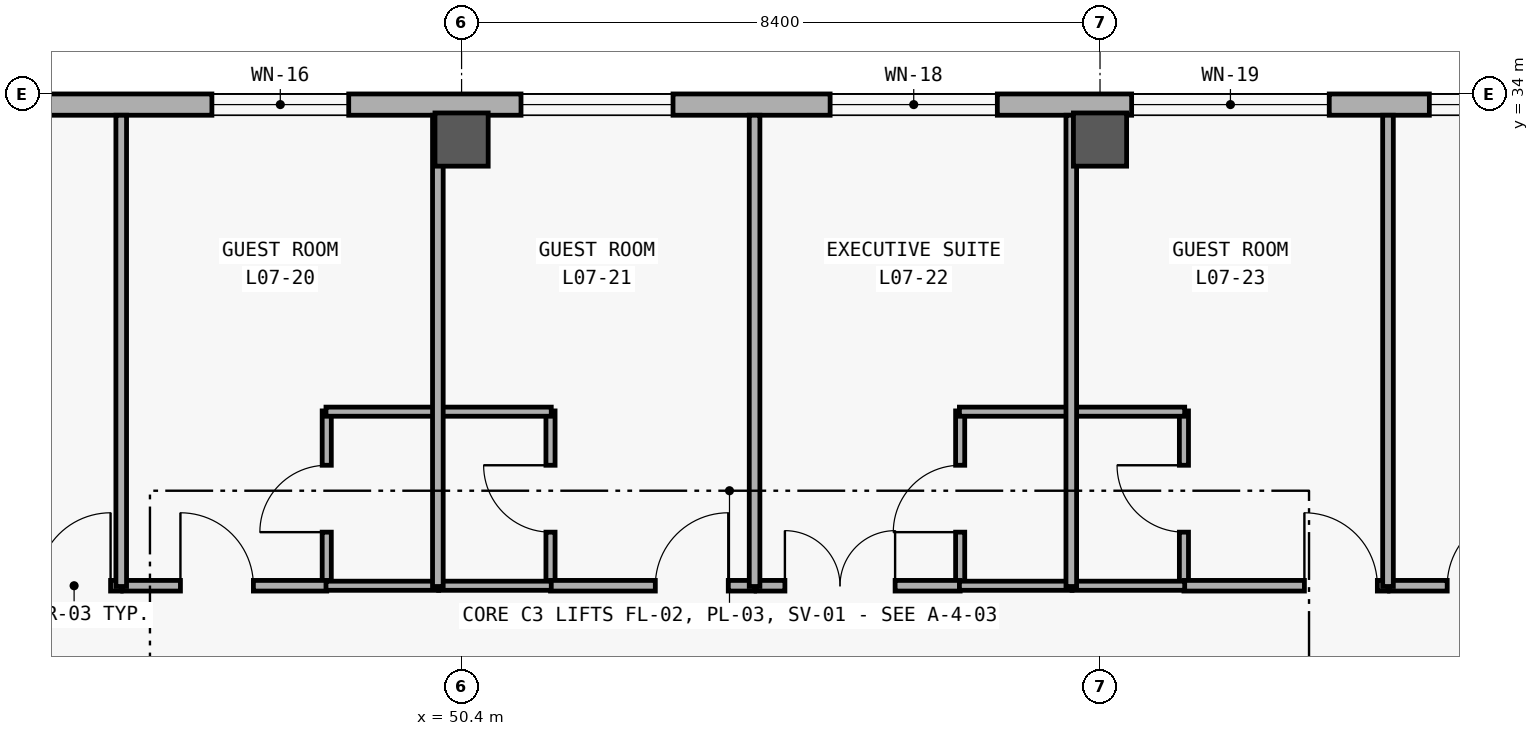
"""IFC4 building model, lengths in metres.
Left out: names, types, materials, properties, quantities, classifications, styles, units other than length and angle.
Written with IfcOpenShell. Run it as: python <this file> out.ifc"""

import sys

from ifc_helpers import new_model, si_unit, direction, frame, frame_2d, origin, origin_2d, place, context, subcontext, project, spatial, rectangle, extrude, element, fill, save


model = new_model("IFC4")
c1 = context("Model", 3, precision=1e-05, world=origin(), true_north=direction((0.0, 1.0)))
c2 = subcontext(c1, "Body", "Model", "MODEL_VIEW")
j1 = project(units=[si_unit("LENGTHUNIT", "METRE"), si_unit("PLANEANGLEUNIT", "RADIAN")], contexts=[c1])
p1 = place(None, origin())
s1 = spatial("IfcSite", under=j1, at=p1, CompositionType="ELEMENT")
p2 = place(p1, origin())
s2 = spatial("IfcBuilding", under=s1, at=p2, CompositionType="ELEMENT")
p3 = place(p2, frame((0.0, 0.0, 30.0)))
s3 = spatial("IfcBuildingStorey", under=s2, at=p3, CompositionType="ELEMENT", Elevation=30.0)
for number, where, z_axis, x_axis in (
    (1, (50.4, 33.4, 0.0), (0.0, 0.0, 1.0), (1.0, 0.0, 0.0)),
    (2, (58.8, 33.4, 0.0), (0.0, 0.0, 1.0), (1.0, 0.0, 0.0)),
):
    element("IfcColumn", number, at=place(p3, frame(where, z_axis=z_axis, x_axis=x_axis)), inside=s3, PredefinedType="COLUMN", context=c2, shape_type="SweptSolid", body=[
        extrude(rectangle(XDim=0.7, YDim=0.7, at=origin_2d()), origin(), (0.0, 0.0, 1.0), 3.6),
    ])
p4 = place(p3, frame((8.68, 33.86, 0.0), z_axis=(0.0, 0.0, 1.0), x_axis=(1.0, 0.0, 0.0)))
e3 = element("IfcWall", 3, at=p4, inside=s3, PredefinedType="SOLIDWALL", context=c2, shape_type="SweptSolid", body=[
    extrude(rectangle(XDim=66.64, YDim=0.28, at=frame_2d((33.32, 0.0))), origin(), (0.0, 0.0, 1.0), 3.34),
])
p5 = place(p4, frame((5.195, 0.0, 0.85)))
e4 = element("IfcOpeningElement", 4, at=p5, cuts=e3, PredefinedType="OPENING", context=c2, shape_type="SweptSolid", body=[
    extrude(rectangle(XDim=2.0, YDim=1.65, at=frame_2d((1.0, 0.825))), frame((0.0, 0.15, 0.0), z_axis=(0.0, -1.0, 0.0), x_axis=(1.0, 0.0, 0.0)), (0.0, 0.0, 1.0), 0.3),
])
p6 = place(p4, frame((13.209, 0.0, 0.85)))
e5 = element("IfcOpeningElement", 5, at=p6, cuts=e3, PredefinedType="OPENING", context=c2, shape_type="SweptSolid", body=[
    extrude(rectangle(XDim=2.25, YDim=1.75, at=frame_2d((1.125, 0.875))), frame((0.0, 0.15, 0.0), z_axis=(0.0, -1.0, 0.0), x_axis=(1.0, 0.0, 0.0)), (0.0, 0.0, 1.0), 0.3),
])
p7 = place(p4, frame((17.226, 0.0, 0.85)))
e6 = element("IfcOpeningElement", 6, at=p7, cuts=e3, PredefinedType="OPENING", context=c2, shape_type="SweptSolid", body=[
    extrude(rectangle(XDim=2.55, YDim=1.8, at=frame_2d((1.275, 0.9))), frame((0.0, 0.15, 0.0), z_axis=(0.0, -1.0, 0.0), x_axis=(1.0, 0.0, 0.0)), (0.0, 0.0, 1.0), 0.3),
])
p8 = place(p4, frame((21.242, 0.0, 0.85)))
e7 = element("IfcOpeningElement", 7, at=p8, cuts=e3, PredefinedType="OPENING", context=c2, shape_type="SweptSolid", body=[
    extrude(rectangle(XDim=2.85, YDim=1.85, at=frame_2d((1.425, 0.925))), frame((0.0, 0.15, 0.0), z_axis=(0.0, -1.0, 0.0), x_axis=(1.0, 0.0, 0.0)), (0.0, 0.0, 1.0), 0.3),
])
p9 = place(p4, frame((25.234, 0.0, 0.85)))
e8 = element("IfcOpeningElement", 8, at=p9, cuts=e3, PredefinedType="OPENING", context=c2, shape_type="SweptSolid", body=[
    extrude(rectangle(XDim=3.2, YDim=1.95, at=frame_2d((1.6, 0.975))), frame((0.0, 0.15, 0.0), z_axis=(0.0, -1.0, 0.0), x_axis=(1.0, 0.0, 0.0)), (0.0, 0.0, 1.0), 0.3),
])
p10 = place(p4, frame((30.302, 0.0, 0.85)))
e9 = element("IfcOpeningElement", 9, at=p10, cuts=e3, PredefinedType="OPENING", context=c2, shape_type="SweptSolid", body=[
    extrude(rectangle(XDim=1.4, YDim=1.6, at=frame_2d((0.7, 0.8))), frame((0.0, 0.15, 0.0), z_axis=(0.0, -1.0, 0.0), x_axis=(1.0, 0.0, 0.0)), (0.0, 0.0, 1.0), 0.3),
])
p11 = place(p4, frame((34.369, 0.0, 0.85)))
e10 = element("IfcOpeningElement", 10, at=p11, cuts=e3, PredefinedType="OPENING", context=c2, shape_type="SweptSolid", body=[
    extrude(rectangle(XDim=1.6, YDim=1.6, at=frame_2d((0.8, 0.8))), frame((0.0, 0.15, 0.0), z_axis=(0.0, -1.0, 0.0), x_axis=(1.0, 0.0, 0.0)), (0.0, 0.0, 1.0), 0.3),
])
p12 = place(p4, frame((38.435, 0.0, 0.85)))
e11 = element("IfcOpeningElement", 11, at=p12, cuts=e3, PredefinedType="OPENING", context=c2, shape_type="SweptSolid", body=[
    extrude(rectangle(XDim=1.8, YDim=1.6, at=frame_2d((0.9, 0.8))), frame((0.0, 0.15, 0.0), z_axis=(0.0, -1.0, 0.0), x_axis=(1.0, 0.0, 0.0)), (0.0, 0.0, 1.0), 0.3),
])
p13 = place(p4, frame((42.502, 0.0, 0.85)))
e12 = element("IfcOpeningElement", 12, at=p13, cuts=e3, PredefinedType="OPENING", context=c2, shape_type="SweptSolid", body=[
    extrude(rectangle(XDim=2.0, YDim=1.65, at=frame_2d((1.0, 0.825))), frame((0.0, 0.15, 0.0), z_axis=(0.0, -1.0, 0.0), x_axis=(1.0, 0.0, 0.0)), (0.0, 0.0, 1.0), 0.3),
])
p14 = place(p4, frame((46.569, 0.0, 0.85)))
e13 = element("IfcOpeningElement", 13, at=p14, cuts=e3, PredefinedType="OPENING", context=c2, shape_type="SweptSolid", body=[
    extrude(rectangle(XDim=2.2, YDim=1.65, at=frame_2d((1.1, 0.825))), frame((0.0, 0.15, 0.0), z_axis=(0.0, -1.0, 0.0), x_axis=(1.0, 0.0, 0.0)), (0.0, 0.0, 1.0), 0.3),
])
p15 = place(p4, frame((50.536, 0.0, 0.85)))
e14 = element("IfcOpeningElement", 14, at=p15, cuts=e3, PredefinedType="OPENING", context=c2, shape_type="SweptSolid", body=[
    extrude(rectangle(XDim=2.6, YDim=2.2, at=frame_2d((1.3, 1.1))), frame((0.0, 0.15, 0.0), z_axis=(0.0, -1.0, 0.0), x_axis=(1.0, 0.0, 0.0)), (0.0, 0.0, 1.0), 0.3),
])
p16 = place(p4, frame((54.453, 0.0, 0.85)))
e15 = element("IfcOpeningElement", 15, at=p16, cuts=e3, PredefinedType="OPENING", context=c2, shape_type="SweptSolid", body=[
    extrude(rectangle(XDim=3.1, YDim=2.2, at=frame_2d((1.55, 1.1))), frame((0.0, 0.15, 0.0), z_axis=(0.0, -1.0, 0.0), x_axis=(1.0, 0.0, 0.0)), (0.0, 0.0, 1.0), 0.3),
])
p17 = place(p4, frame((59.545, 0.0, 0.85)))
e16 = element("IfcOpeningElement", 16, at=p17, cuts=e3, PredefinedType="OPENING", context=c2, shape_type="SweptSolid", body=[
    extrude(rectangle(XDim=1.25, YDim=1.45, at=frame_2d((0.625, 0.725))), frame((0.0, 0.15, 0.0), z_axis=(0.0, -1.0, 0.0), x_axis=(1.0, 0.0, 0.0)), (0.0, 0.0, 1.0), 0.3),
])
p18 = place(p4, frame((63.662, 0.0, 0.85)))
e17 = element("IfcOpeningElement", 17, at=p18, cuts=e3, PredefinedType="OPENING", context=c2, shape_type="SweptSolid", body=[
    extrude(rectangle(XDim=1.35, YDim=1.55, at=frame_2d((0.675, 0.775))), frame((0.0, 0.15, 0.0), z_axis=(0.0, -1.0, 0.0), x_axis=(1.0, 0.0, 0.0)), (0.0, 0.0, 1.0), 0.3),
])
p19 = place(p3, frame((48.626, 27.52, 0.0), z_axis=(0.0, 0.0, 1.0), x_axis=(0.0, 1.0, 0.0)))
e18 = element("IfcWall", 18, at=p19, inside=s3, PredefinedType="PARTITIONING", context=c2, shape_type="SweptSolid", body=[
    extrude(rectangle(XDim=2.31, YDim=0.12, at=frame_2d((1.155, 0.0))), origin(), (0.0, 0.0, 1.0), 2.48),
])
p20 = place(p19, frame((0.715, 0.0, 0.0)))
e19 = element("IfcOpeningElement", 19, at=p20, cuts=e18, PredefinedType="OPENING", context=c2, shape_type="SweptSolid", body=[
    extrude(rectangle(XDim=0.88, YDim=2.15, at=frame_2d((0.44, 1.075))), frame((0.0, 0.07, 0.0), z_axis=(0.0, -1.0, 0.0), x_axis=(1.0, 0.0, 0.0)), (0.0, 0.0, 1.0), 0.14),
])
p21 = place(p3, frame((51.57, 27.52, 0.0), z_axis=(0.0, 0.0, 1.0), x_axis=(0.0, 1.0, 0.0)))
e20 = element("IfcWall", 20, at=p21, inside=s3, PredefinedType="PARTITIONING", context=c2, shape_type="SweptSolid", body=[
    extrude(rectangle(XDim=2.31, YDim=0.12, at=frame_2d((1.155, 0.0))), origin(), (0.0, 0.0, 1.0), 2.48),
])
p22 = place(p21, frame((0.715, 0.0, 0.0)))
e21 = element("IfcOpeningElement", 21, at=p22, cuts=e20, PredefinedType="OPENING", context=c2, shape_type="SweptSolid", body=[
    extrude(rectangle(XDim=0.88, YDim=2.15, at=frame_2d((0.44, 1.075))), frame((0.0, 0.07, 0.0), z_axis=(0.0, -1.0, 0.0), x_axis=(1.0, 0.0, 0.0)), (0.0, 0.0, 1.0), 0.14),
])
p23 = place(p3, frame((56.96, 27.52, 0.0), z_axis=(0.0, 0.0, 1.0), x_axis=(0.0, 1.0, 0.0)))
e22 = element("IfcWall", 22, at=p23, inside=s3, PredefinedType="PARTITIONING", context=c2, shape_type="SweptSolid", body=[
    extrude(rectangle(XDim=2.31, YDim=0.12, at=frame_2d((1.155, 0.0))), origin(), (0.0, 0.0, 1.0), 2.48),
])
p24 = place(p23, frame((0.715, 0.0, 0.0)))
e23 = element("IfcOpeningElement", 23, at=p24, cuts=e22, PredefinedType="OPENING", context=c2, shape_type="SweptSolid", body=[
    extrude(rectangle(XDim=0.88, YDim=2.15, at=frame_2d((0.44, 1.075))), frame((0.0, 0.07, 0.0), z_axis=(0.0, -1.0, 0.0), x_axis=(1.0, 0.0, 0.0)), (0.0, 0.0, 1.0), 0.14),
])
p25 = place(p3, frame((59.904, 27.52, 0.0), z_axis=(0.0, 0.0, 1.0), x_axis=(0.0, 1.0, 0.0)))
e24 = element("IfcWall", 24, at=p25, inside=s3, PredefinedType="PARTITIONING", context=c2, shape_type="SweptSolid", body=[
    extrude(rectangle(XDim=2.31, YDim=0.12, at=frame_2d((1.155, 0.0))), origin(), (0.0, 0.0, 1.0), 2.48),
])
p26 = place(p25, frame((0.715, 0.0, 0.0)))
e25 = element("IfcOpeningElement", 25, at=p26, cuts=e24, PredefinedType="OPENING", context=c2, shape_type="SweptSolid", body=[
    extrude(rectangle(XDim=0.88, YDim=2.15, at=frame_2d((0.44, 1.075))), frame((0.0, 0.07, 0.0), z_axis=(0.0, -1.0, 0.0), x_axis=(1.0, 0.0, 0.0)), (0.0, 0.0, 1.0), 0.14),
])
p27 = place(p3, frame((43.237, 27.53, 0.0), z_axis=(0.0, 0.0, 1.0), x_axis=(1.0, 0.0, 0.0)))
e26 = element("IfcWall", 26, at=p27, inside=s3, PredefinedType="PARTITIONING", context=c2, shape_type="SweptSolid", body=[
    extrude(rectangle(XDim=2.685, YDim=0.14, at=frame_2d((1.343, 0.0))), origin(), (0.0, 0.0, 1.0), 2.48),
])
p28 = place(p27, frame((1.585, 0.0, 0.0)))
e27 = element("IfcOpeningElement", 27, at=p28, cuts=e26, PredefinedType="OPENING", context=c2, shape_type="SweptSolid", body=[
    extrude(rectangle(XDim=0.96, YDim=2.25, at=frame_2d((0.48, 1.125))), frame((0.0, 0.08, 0.0), z_axis=(0.0, -1.0, 0.0), x_axis=(1.0, 0.0, 0.0)), (0.0, 0.0, 1.0), 0.16),
])
p29 = place(p3, frame((45.942, 27.53, 0.0), z_axis=(0.0, 0.0, 1.0), x_axis=(1.0, 0.0, 0.0)))
e28 = element("IfcWall", 28, at=p29, inside=s3, PredefinedType="PARTITIONING", context=c2, shape_type="SweptSolid", body=[
    extrude(rectangle(XDim=2.684, YDim=0.14, at=frame_2d((1.342, 0.0))), origin(), (0.0, 0.0, 1.0), 2.48),
])
p30 = place(p29, frame((0.759, 0.0, 0.0)))
e29 = element("IfcOpeningElement", 29, at=p30, cuts=e28, PredefinedType="OPENING", context=c2, shape_type="SweptSolid", body=[
    extrude(rectangle(XDim=0.96, YDim=2.25, at=frame_2d((0.48, 1.125))), frame((0.0, 0.08, 0.0), z_axis=(0.0, -1.0, 0.0), x_axis=(1.0, 0.0, 0.0)), (0.0, 0.0, 1.0), 0.16),
])
p31 = place(p3, frame((51.57, 27.53, 0.0), z_axis=(0.0, 0.0, 1.0), x_axis=(1.0, 0.0, 0.0)))
e30 = element("IfcWall", 30, at=p31, inside=s3, PredefinedType="PARTITIONING", context=c2, shape_type="SweptSolid", body=[
    extrude(rectangle(XDim=2.685, YDim=0.14, at=frame_2d((1.342, 0.0))), origin(), (0.0, 0.0, 1.0), 2.48),
])
p32 = place(p31, frame((1.379, 0.0, 0.0)))
e31 = element("IfcOpeningElement", 31, at=p32, cuts=e30, PredefinedType="OPENING", context=c2, shape_type="SweptSolid", body=[
    extrude(rectangle(XDim=0.96, YDim=2.25, at=frame_2d((0.48, 1.125))), frame((0.0, 0.08, 0.0), z_axis=(0.0, -1.0, 0.0), x_axis=(1.0, 0.0, 0.0)), (0.0, 0.0, 1.0), 0.16),
])
p33 = place(p3, frame((54.275, 27.53, 0.0), z_axis=(0.0, 0.0, 1.0), x_axis=(1.0, 0.0, 0.0)))
e32 = element("IfcWall", 32, at=p33, inside=s3, PredefinedType="PARTITIONING", context=c2, shape_type="SweptSolid", body=[
    extrude(rectangle(XDim=2.685, YDim=0.14, at=frame_2d((1.343, 0.0))), origin(), (0.0, 0.0, 1.0), 2.48),
])
p34 = place(p33, frame((0.379, 0.0, 0.0)))
e33 = element("IfcOpeningElement", 33, at=p34, cuts=e32, PredefinedType="OPENING", context=c2, shape_type="SweptSolid", body=[
    extrude(rectangle(XDim=1.45, YDim=2.3, at=frame_2d((0.725, 1.15))), frame((0.0, 0.08, 0.0), z_axis=(0.0, -1.0, 0.0), x_axis=(1.0, 0.0, 0.0)), (0.0, 0.0, 1.0), 0.16),
])
p35 = place(p3, frame((59.904, 27.53, 0.0), z_axis=(0.0, 0.0, 1.0), x_axis=(1.0, 0.0, 0.0)))
e34 = element("IfcWall", 34, at=p35, inside=s3, PredefinedType="PARTITIONING", context=c2, shape_type="SweptSolid", body=[
    extrude(rectangle(XDim=2.685, YDim=0.14, at=frame_2d((1.343, 0.0))), origin(), (0.0, 0.0, 1.0), 2.48),
])
p36 = place(p35, frame((1.585, 0.0, 0.0)))
e35 = element("IfcOpeningElement", 35, at=p36, cuts=e34, PredefinedType="OPENING", context=c2, shape_type="SweptSolid", body=[
    extrude(rectangle(XDim=0.96, YDim=2.25, at=frame_2d((0.48, 1.125))), frame((0.0, 0.08, 0.0), z_axis=(0.0, -1.0, 0.0), x_axis=(1.0, 0.0, 0.0)), (0.0, 0.0, 1.0), 0.16),
])
p37 = place(p3, frame((62.609, 27.53, 0.0), z_axis=(0.0, 0.0, 1.0), x_axis=(1.0, 0.0, 0.0)))
e36 = element("IfcWall", 36, at=p37, inside=s3, PredefinedType="PARTITIONING", context=c2, shape_type="SweptSolid", body=[
    extrude(rectangle(XDim=2.685, YDim=0.14, at=frame_2d((1.343, 0.0))), origin(), (0.0, 0.0, 1.0), 2.48),
])
p38 = place(p37, frame((0.759, 0.0, 0.0)))
e37 = element("IfcOpeningElement", 37, at=p38, cuts=e36, PredefinedType="OPENING", context=c2, shape_type="SweptSolid", body=[
    extrude(rectangle(XDim=0.96, YDim=2.25, at=frame_2d((0.48, 1.125))), frame((0.0, 0.08, 0.0), z_axis=(0.0, -1.0, 0.0), x_axis=(1.0, 0.0, 0.0)), (0.0, 0.0, 1.0), 0.16),
])
for number, where, z_axis, x_axis in (
    (38, (48.616, 27.53, 0.0), (0.0, 0.0, 1.0), (1.0, 0.0, 0.0)),
    (39, (48.616, 29.82, 0.0), (0.0, 0.0, 1.0), (1.0, 0.0, 0.0)),
):
    element("IfcWall", number, at=place(p3, frame(where, z_axis=z_axis, x_axis=x_axis)), inside=s3, PredefinedType="PARTITIONING", context=c2, shape_type="SweptSolid", body=[
        extrude(rectangle(XDim=1.482, YDim=0.12, at=frame_2d((0.741, 0.0))), origin(), (0.0, 0.0, 1.0), 2.48),
    ])
for number, where, z_axis, x_axis in (
    (40, (50.098, 27.53, 0.0), (0.0, 0.0, 1.0), (1.0, 0.0, 0.0)),
    (41, (50.098, 29.82, 0.0), (0.0, 0.0, 1.0), (1.0, 0.0, 0.0)),
):
    element("IfcWall", number, at=place(p3, frame(where, z_axis=z_axis, x_axis=x_axis)), inside=s3, PredefinedType="PARTITIONING", context=c2, shape_type="SweptSolid", body=[
        extrude(rectangle(XDim=1.482, YDim=0.12, at=frame_2d((0.741, 0.0))), origin(), (0.0, 0.0, 1.0), 2.48),
    ])
for number, where, z_axis, x_axis in (
    (42, (56.95, 27.53, 0.0), (0.0, 0.0, 1.0), (1.0, 0.0, 0.0)),
    (43, (56.95, 29.82, 0.0), (0.0, 0.0, 1.0), (1.0, 0.0, 0.0)),
):
    element("IfcWall", number, at=place(p3, frame(where, z_axis=z_axis, x_axis=x_axis)), inside=s3, PredefinedType="PARTITIONING", context=c2, shape_type="SweptSolid", body=[
        extrude(rectangle(XDim=1.482, YDim=0.12, at=frame_2d((0.741, 0.0))), origin(), (0.0, 0.0, 1.0), 2.48),
    ])
for number, where, z_axis, x_axis in (
    (44, (58.432, 27.53, 0.0), (0.0, 0.0, 1.0), (1.0, 0.0, 0.0)),
    (45, (58.432, 29.82, 0.0), (0.0, 0.0, 1.0), (1.0, 0.0, 0.0)),
):
    element("IfcWall", number, at=place(p3, frame(where, z_axis=z_axis, x_axis=x_axis)), inside=s3, PredefinedType="PARTITIONING", context=c2, shape_type="SweptSolid", body=[
        extrude(rectangle(XDim=1.482, YDim=0.12, at=frame_2d((0.741, 0.0))), origin(), (0.0, 0.0, 1.0), 2.48),
    ])
for number, where, z_axis, x_axis in (
    (46, (45.922, 27.52, 0.0), (0.0, 0.0, 1.0), (0.0, 1.0, 0.0)),
    (47, (50.088, 27.52, 0.0), (0.0, 0.0, 1.0), (0.0, 1.0, 0.0)),
    (48, (54.255, 27.52, 0.0), (0.0, 0.0, 1.0), (0.0, 1.0, 0.0)),
    (49, (58.422, 27.52, 0.0), (0.0, 0.0, 1.0), (0.0, 1.0, 0.0)),
    (50, (62.589, 27.52, 0.0), (0.0, 0.0, 1.0), (0.0, 1.0, 0.0)),
):
    element("IfcWall", number, at=place(p3, frame(where, z_axis=z_axis, x_axis=x_axis)), inside=s3, PredefinedType="PARTITIONING", context=c2, shape_type="SweptSolid", body=[
        extrude(rectangle(XDim=6.2, YDim=0.14, at=frame_2d((3.1, 0.0))), origin(), (0.0, 0.0, 1.0), 2.48),
    ])
p39 = place(p12, origin())
e51 = element("IfcWindow", 51, at=p39, inside=s3, PartitioningType="SINGLE_PANEL", PredefinedType="WINDOW", context=c2, shape_type="SweptSolid", body=[
    extrude(rectangle(XDim=1.8, YDim=1.6, at=frame_2d((0.9, 0.8))), frame((0.0, 0.03, 0.0), z_axis=(0.0, -1.0, 0.0), x_axis=(1.0, 0.0, 0.0)), (0.0, 0.0, 1.0), 0.06),
])
fill(e11, e51)
p40 = place(p13, origin())
e52 = element("IfcWindow", 52, at=p40, inside=s3, PartitioningType="SINGLE_PANEL", PredefinedType="WINDOW", context=c2, shape_type="SweptSolid", body=[
    extrude(rectangle(XDim=2.0, YDim=1.65, at=frame_2d((1.0, 0.825))), frame((0.0, 0.03, 0.0), z_axis=(0.0, -1.0, 0.0), x_axis=(1.0, 0.0, 0.0)), (0.0, 0.0, 1.0), 0.06),
])
fill(e12, e52)
p41 = place(p14, origin())
e53 = element("IfcWindow", 53, at=p41, inside=s3, PartitioningType="SINGLE_PANEL", PredefinedType="WINDOW", context=c2, shape_type="SweptSolid", body=[
    extrude(rectangle(XDim=2.2, YDim=1.65, at=frame_2d((1.1, 0.825))), frame((0.0, 0.03, 0.0), z_axis=(0.0, -1.0, 0.0), x_axis=(1.0, 0.0, 0.0)), (0.0, 0.0, 1.0), 0.06),
])
fill(e13, e53)
p42 = place(p15, origin())
e54 = element("IfcWindow", 54, at=p42, inside=s3, PartitioningType="SINGLE_PANEL", PredefinedType="WINDOW", context=c2, shape_type="SweptSolid", body=[
    extrude(rectangle(XDim=2.6, YDim=2.2, at=frame_2d((1.3, 1.1))), frame((0.0, 0.03, 0.0), z_axis=(0.0, -1.0, 0.0), x_axis=(1.0, 0.0, 0.0)), (0.0, 0.0, 1.0), 0.06),
])
fill(e14, e54)
p43 = place(p16, origin())
e55 = element("IfcWindow", 55, at=p43, inside=s3, PartitioningType="SINGLE_PANEL", PredefinedType="WINDOW", context=c2, shape_type="SweptSolid", body=[
    extrude(rectangle(XDim=3.1, YDim=2.2, at=frame_2d((1.55, 1.1))), frame((0.0, 0.03, 0.0), z_axis=(0.0, -1.0, 0.0), x_axis=(1.0, 0.0, 0.0)), (0.0, 0.0, 1.0), 0.06),
])
fill(e15, e55)
p44 = place(p20, origin())
e56 = element("IfcDoor", 56, at=p44, inside=s3, OperationType="SINGLE_SWING_LEFT", PredefinedType="DOOR", context=c2, shape_type="SweptSolid", body=[
    extrude(rectangle(XDim=0.88, YDim=2.15, at=frame_2d((0.44, 1.075))), frame((0.0, 0.025, 0.0), z_axis=(0.0, -1.0, 0.0), x_axis=(1.0, 0.0, 0.0)), (0.0, 0.0, 1.0), 0.05),
])
fill(e19, e56)
p45 = place(p22, origin())
e57 = element("IfcDoor", 57, at=p45, inside=s3, OperationType="SINGLE_SWING_RIGHT", PredefinedType="DOOR", context=c2, shape_type="SweptSolid", body=[
    extrude(rectangle(XDim=0.88, YDim=2.15, at=frame_2d((0.44, 1.075))), frame((0.0, 0.025, 0.0), z_axis=(0.0, -1.0, 0.0), x_axis=(1.0, 0.0, 0.0)), (0.0, 0.0, 1.0), 0.05),
])
fill(e21, e57)
p46 = place(p24, origin())
e58 = element("IfcDoor", 58, at=p46, inside=s3, OperationType="SINGLE_SWING_LEFT", PredefinedType="DOOR", context=c2, shape_type="SweptSolid", body=[
    extrude(rectangle(XDim=0.88, YDim=2.15, at=frame_2d((0.44, 1.075))), frame((0.0, 0.025, 0.0), z_axis=(0.0, -1.0, 0.0), x_axis=(1.0, 0.0, 0.0)), (0.0, 0.0, 1.0), 0.05),
])
fill(e23, e58)
p47 = place(p26, origin())
e59 = element("IfcDoor", 59, at=p47, inside=s3, OperationType="SINGLE_SWING_RIGHT", PredefinedType="DOOR", context=c2, shape_type="SweptSolid", body=[
    extrude(rectangle(XDim=0.88, YDim=2.15, at=frame_2d((0.44, 1.075))), frame((0.0, 0.025, 0.0), z_axis=(0.0, -1.0, 0.0), x_axis=(1.0, 0.0, 0.0)), (0.0, 0.0, 1.0), 0.05),
])
fill(e25, e59)
p48 = place(p28, origin())
e60 = element("IfcDoor", 60, at=p48, inside=s3, OperationType="SINGLE_SWING_RIGHT", PredefinedType="DOOR", context=c2, shape_type="SweptSolid", body=[
    extrude(rectangle(XDim=0.96, YDim=2.25, at=frame_2d((0.48, 1.125))), frame((0.0, 0.025, 0.0), z_axis=(0.0, -1.0, 0.0), x_axis=(1.0, 0.0, 0.0)), (0.0, 0.0, 1.0), 0.05),
])
fill(e27, e60)
p49 = place(p30, origin())
e61 = element("IfcDoor", 61, at=p49, inside=s3, OperationType="SINGLE_SWING_LEFT", PredefinedType="DOOR", context=c2, shape_type="SweptSolid", body=[
    extrude(rectangle(XDim=0.96, YDim=2.25, at=frame_2d((0.48, 1.125))), frame((0.0, 0.025, 0.0), z_axis=(0.0, -1.0, 0.0), x_axis=(1.0, 0.0, 0.0)), (0.0, 0.0, 1.0), 0.05),
])
fill(e29, e61)
p50 = place(p32, origin())
e62 = element("IfcDoor", 62, at=p50, inside=s3, OperationType="SINGLE_SWING_RIGHT", PredefinedType="DOOR", context=c2, shape_type="SweptSolid", body=[
    extrude(rectangle(XDim=0.96, YDim=2.25, at=frame_2d((0.48, 1.125))), frame((0.0, 0.025, 0.0), z_axis=(0.0, -1.0, 0.0), x_axis=(1.0, 0.0, 0.0)), (0.0, 0.0, 1.0), 0.05),
])
fill(e31, e62)
p51 = place(p34, origin())
e63 = element("IfcDoor", 63, at=p51, inside=s3, OperationType="DOUBLE_DOOR_SINGLE_SWING", PredefinedType="DOOR", context=c2, shape_type="SweptSolid", body=[
    extrude(rectangle(XDim=1.45, YDim=2.3, at=frame_2d((0.725, 1.15))), frame((0.0, 0.025, 0.0), z_axis=(0.0, -1.0, 0.0), x_axis=(1.0, 0.0, 0.0)), (0.0, 0.0, 1.0), 0.05),
])
fill(e33, e63)
p52 = place(p36, origin())
e64 = element("IfcDoor", 64, at=p52, inside=s3, OperationType="SINGLE_SWING_LEFT", PredefinedType="DOOR", context=c2, shape_type="SweptSolid", body=[
    extrude(rectangle(XDim=0.96, YDim=2.25, at=frame_2d((0.48, 1.125))), frame((0.0, 0.025, 0.0), z_axis=(0.0, -1.0, 0.0), x_axis=(1.0, 0.0, 0.0)), (0.0, 0.0, 1.0), 0.05),
])
fill(e35, e64)
p53 = place(p38, origin())
e65 = element("IfcDoor", 65, at=p53, inside=s3, OperationType="SINGLE_SWING_RIGHT", PredefinedType="DOOR", context=c2, shape_type="SweptSolid", body=[
    extrude(rectangle(XDim=0.96, YDim=2.25, at=frame_2d((0.48, 1.125))), frame((0.0, 0.025, 0.0), z_axis=(0.0, -1.0, 0.0), x_axis=(1.0, 0.0, 0.0)), (0.0, 0.0, 1.0), 0.05),
])
fill(e37, e65)
save(model, sys.argv[1])
